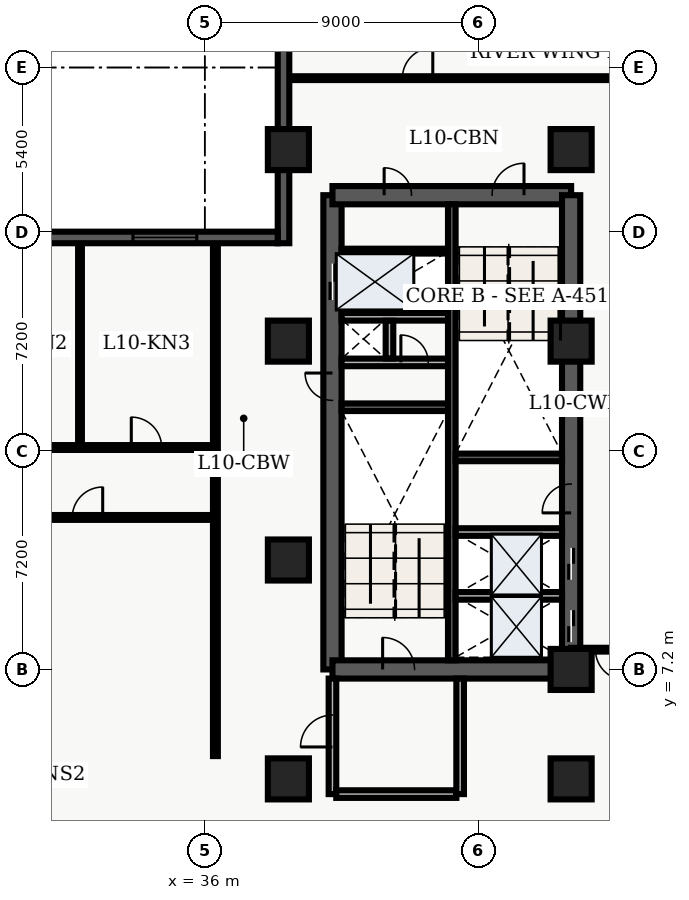
"""IFC4 building model, lengths in metres.
Left out: names, types, materials, properties, quantities, classifications, styles, units other than length and angle.
Written with IfcOpenShell. Run it as: python <this file> out.ifc"""

import sys

from ifc_helpers import new_model, entity, si_unit, converted_unit, direction, frame, origin_with_axes, origin_2d_with_axis, place, context, subcontext, project, spatial, polyline, rectangle, outline, extrude, element, fill, save


model = new_model("IFC4")
c1 = context("Model", 3, precision=1e-05, world=origin_with_axes(), true_north=direction((0.0, 1.0)))
c2 = subcontext(c1, "Body", "Model", "MODEL_VIEW")
j1 = project(units=[si_unit("LENGTHUNIT", "METRE"), converted_unit("PLANEANGLEUNIT", "DEGREE", entity("IfcPlaneAngleMeasure", 0.017), si_unit("PLANEANGLEUNIT", "RADIAN"), dimensions=[0, 0, 0, 0, 0, 0, 0])], contexts=[c1])
p1 = place(None, origin_with_axes())
s1 = spatial("IfcSite", under=j1, at=p1, CompositionType="ELEMENT")
p2 = place(p1, origin_with_axes())
s2 = spatial("IfcBuilding", under=s1, at=p2, CompositionType="ELEMENT")
p3 = place(p2, frame((0.0, 0.0, 44.4), z_axis=(0.0, 0.0, 1.0), x_axis=(1.0, 0.0, 0.0)))
s3 = spatial("IfcBuildingStorey", under=s2, at=p3, CompositionType="ELEMENT", Elevation=44.4)
p4 = place(p3, frame((40.2, 7.2, 0.0), z_axis=(0.0, 0.0, 1.0), x_axis=(0.0, 1.0, 0.0)))
e1 = element("IfcWall", 1, at=p4, inside=s3, PredefinedType="SHEAR", context=c2, shape_type="SweptSolid", body=[
    extrude(outline(polyline([(0.0, -0.3), (15.6, -0.3), (15.6, 0.3), (0.0, 0.3), (0.0, -0.3)])), origin_with_axes(), (0.0, 0.0, 1.0), 3.66),
])
p5 = place(p4, frame((12.75, 0.0, 0.0), z_axis=(0.0, 0.0, 1.0), x_axis=(1.0, 0.0, 0.0)))
e2 = element("IfcOpeningElement", 2, at=p5, cuts=e1, PredefinedType="OPENING", context=c2, shape_type="SweptSolid", body=[
    extrude(rectangle(XDim=1.2, YDim=0.62, at=origin_2d_with_axis()), origin_with_axes(), (0.0, 0.0, 1.0), 2.15),
])
p6 = place(p4, frame((9.3, 0.0, 0.0), z_axis=(0.0, 0.0, 1.0), x_axis=(1.0, 0.0, 0.0)))
e3 = element("IfcOpeningElement", 3, at=p6, cuts=e1, PredefinedType="OPENING", context=c2, shape_type="SweptSolid", body=[
    extrude(rectangle(XDim=0.9, YDim=0.62, at=origin_2d_with_axis()), origin_with_axes(), (0.0, 0.0, 1.0), 2.15),
])
p7 = place(p3, frame((40.2, 7.2, 0.0), z_axis=(0.0, 0.0, 1.0), x_axis=(1.0, 0.0, 0.0)))
e4 = element("IfcWall", 4, at=p7, inside=s3, PredefinedType="SHEAR", context=c2, shape_type="SweptSolid", body=[
    extrude(outline(polyline([(0.0, -0.3), (7.85, -0.3), (7.85, 0.3), (0.0, 0.3), (0.0, -0.3)])), origin_with_axes(), (0.0, 0.0, 1.0), 3.66),
])
p8 = place(p7, frame((2.175, 0.0, 0.0), z_axis=(0.0, 0.0, 1.0), x_axis=(1.0, 0.0, 0.0)))
e5 = element("IfcOpeningElement", 5, at=p8, cuts=e4, PredefinedType="OPENING", context=c2, shape_type="SweptSolid", body=[
    extrude(rectangle(XDim=1.05, YDim=0.62, at=origin_2d_with_axis()), origin_with_axes(), (0.0, 0.0, 1.0), 2.15),
])
p9 = place(p3, frame((40.2, 22.8, 0.0), z_axis=(0.0, 0.0, 1.0), x_axis=(1.0, 0.0, 0.0)))
e6 = element("IfcWall", 6, at=p9, inside=s3, PredefinedType="SHEAR", context=c2, shape_type="SweptSolid", body=[
    extrude(outline(polyline([(0.0, -0.3), (7.85, -0.3), (7.85, 0.3), (0.0, 0.3), (0.0, -0.3)])), origin_with_axes(), (0.0, 0.0, 1.0), 3.66),
])
p10 = place(p9, frame((5.775, 0.0, 0.0), z_axis=(0.0, 0.0, 1.0), x_axis=(1.0, 0.0, 0.0)))
e7 = element("IfcOpeningElement", 7, at=p10, cuts=e6, PredefinedType="OPENING", context=c2, shape_type="SweptSolid", body=[
    extrude(rectangle(XDim=1.05, YDim=0.62, at=origin_2d_with_axis()), origin_with_axes(), (0.0, 0.0, 1.0), 2.15),
])
p11 = place(p9, frame((2.15, 0.0, 0.0), z_axis=(0.0, 0.0, 1.0), x_axis=(1.0, 0.0, 0.0)))
e8 = element("IfcOpeningElement", 8, at=p11, cuts=e6, PredefinedType="OPENING", context=c2, shape_type="SweptSolid", body=[
    extrude(rectangle(XDim=0.9, YDim=0.62, at=origin_2d_with_axis()), origin_with_axes(), (0.0, 0.0, 1.0), 2.15),
])
p12 = place(p3, frame((48.05, 7.2, 0.0), z_axis=(0.0, 0.0, 1.0), x_axis=(0.0, 1.0, 0.0)))
e9 = element("IfcWall", 9, at=p12, inside=s3, PredefinedType="SHEAR", context=c2, shape_type="SweptSolid", body=[
    extrude(outline(polyline([(0.0, -0.3), (15.6, -0.3), (15.6, 0.3), (0.0, 0.3), (0.0, -0.3)])), origin_with_axes(), (0.0, 0.0, 1.0), 3.66),
])
p13 = place(p12, frame((1.425, 0.0, 0.0), z_axis=(0.0, 0.0, 1.0), x_axis=(1.0, 0.0, 0.0)))
e10 = element("IfcOpeningElement", 10, at=p13, cuts=e9, PredefinedType="OPENING", context=c2, shape_type="SweptSolid", body=[
    extrude(rectangle(XDim=1.05, YDim=0.62, at=origin_2d_with_axis()), origin_with_axes(), (0.0, 0.0, 1.0), 2.15),
])
p14 = place(p12, frame((3.475, 0.0, 0.0), z_axis=(0.0, 0.0, 1.0), x_axis=(1.0, 0.0, 0.0)))
e11 = element("IfcOpeningElement", 11, at=p14, cuts=e9, PredefinedType="OPENING", context=c2, shape_type="SweptSolid", body=[
    extrude(rectangle(XDim=1.05, YDim=0.62, at=origin_2d_with_axis()), origin_with_axes(), (0.0, 0.0, 1.0), 2.15),
])
p15 = place(p12, frame((5.625, 0.0, 0.0), z_axis=(0.0, 0.0, 1.0), x_axis=(1.0, 0.0, 0.0)))
e12 = element("IfcOpeningElement", 12, at=p15, cuts=e9, PredefinedType="OPENING", context=c2, shape_type="SweptSolid", body=[
    extrude(rectangle(XDim=0.95, YDim=0.62, at=origin_2d_with_axis()), origin_with_axes(), (0.0, 0.0, 1.0), 2.15),
])
p16 = place(p3, frame((44.125, 7.5, 0.0), z_axis=(0.0, 0.0, 1.0), x_axis=(0.0, 1.0, 0.0)))
e13 = element("IfcWall", 13, at=p16, inside=s3, PredefinedType="SHEAR", context=c2, shape_type="SweptSolid", body=[
    extrude(outline(polyline([(0.0, -0.125), (15.0, -0.125), (15.0, 0.125), (0.0, 0.125), (0.0, -0.125)])), origin_with_axes(), (0.0, 0.0, 1.0), 3.66),
])
for number, where, z_axis, x_axis in (
    (14, (40.5, 15.825, 0.0), (0.0, 0.0, 1.0), (1.0, 0.0, 0.0)),
    (15, (44.25, 14.175, 0.0), (0.0, 0.0, 1.0), (1.0, 0.0, 0.0)),
):
    element("IfcWall", number, at=place(p3, frame(where, z_axis=z_axis, x_axis=x_axis)), inside=s3, PredefinedType="SHEAR", context=c2, shape_type="SweptSolid", body=[
        extrude(outline(polyline([(0.0, -0.125), (3.5, -0.125), (3.5, 0.125), (0.0, 0.125), (0.0, -0.125)])), origin_with_axes(), (0.0, 0.0, 1.0), 3.66),
    ])
p17 = place(p3, frame((40.5, 17.3, 0.0), z_axis=(0.0, 0.0, 1.0), x_axis=(1.0, 0.0, 0.0)))
e16 = element("IfcWall", 16, at=p17, inside=s3, PredefinedType="SOLIDWALL", context=c2, shape_type="SweptSolid", body=[
    extrude(outline(polyline([(0.0, -0.125), (3.5, -0.125), (3.5, 0.125), (0.0, 0.125), (0.0, -0.125)])), origin_with_axes(), (0.0, 0.0, 1.0), 2.7),
])
p18 = place(p17, frame((2.4, 0.0, 0.0), z_axis=(0.0, 0.0, 1.0), x_axis=(1.0, 0.0, 0.0)))
e17 = element("IfcOpeningElement", 17, at=p18, cuts=e16, PredefinedType="OPENING", context=c2, shape_type="SweptSolid", body=[
    extrude(rectangle(XDim=0.9, YDim=0.27, at=origin_2d_with_axis()), origin_with_axes(), (0.0, 0.0, 1.0), 2.15),
])
p19 = place(p3, frame((40.5, 18.8, 0.0), z_axis=(0.0, 0.0, 1.0), x_axis=(1.0, 0.0, 0.0)))
e18 = element("IfcWall", 18, at=p19, inside=s3, PredefinedType="SOLIDWALL", context=c2, shape_type="SweptSolid", body=[
    extrude(outline(polyline([(0.0, -0.125), (3.5, -0.125), (3.5, 0.125), (0.0, 0.125), (0.0, -0.125)])), origin_with_axes(), (0.0, 0.0, 1.0), 2.7),
])
p20 = place(p3, frame((42.075, 17.43, 0.0), z_axis=(0.0, 0.0, 1.0), x_axis=(0.0, 1.0, 0.0)))
e19 = element("IfcWall", 19, at=p20, inside=s3, PredefinedType="SOLIDWALL", context=c2, shape_type="SweptSolid", body=[
    extrude(outline(polyline([(0.0, -0.125), (1.24, -0.125), (1.24, 0.125), (0.0, 0.125), (0.0, -0.125)])), origin_with_axes(), (0.0, 0.0, 1.0), 2.7),
])
p21 = place(p3, frame((40.2, 3.1, 0.0), z_axis=(0.0, 0.0, 1.0), x_axis=(0.0, 1.0, 0.0)))
e20 = element("IfcWall", 20, at=p21, inside=s3, PredefinedType="SOLIDWALL", context=c2, shape_type="SweptSolid", body=[
    extrude(outline(polyline([(0.0, -0.125), (3.8, -0.125), (3.8, 0.125), (0.0, 0.125), (0.0, -0.125)])), origin_with_axes(), (0.0, 0.0, 1.0), 2.7),
])
p22 = place(p21, frame((2.075, 0.0, 0.0), z_axis=(0.0, 0.0, 1.0), x_axis=(1.0, 0.0, 0.0)))
e21 = element("IfcOpeningElement", 21, at=p22, cuts=e20, PredefinedType="OPENING", context=c2, shape_type="SweptSolid", body=[
    extrude(rectangle(XDim=1.05, YDim=0.27, at=origin_2d_with_axis()), origin_with_axes(), (0.0, 0.0, 1.0), 2.15),
])
p23 = place(p3, frame((40.325, 3.1, 0.0), z_axis=(0.0, 0.0, 1.0), x_axis=(1.0, 0.0, 0.0)))
e22 = element("IfcWall", 22, at=p23, inside=s3, PredefinedType="SOLIDWALL", context=c2, shape_type="SweptSolid", body=[
    extrude(outline(polyline([(0.0, -0.125), (3.95, -0.125), (3.95, 0.125), (0.0, 0.125), (0.0, -0.125)])), origin_with_axes(), (0.0, 0.0, 1.0), 2.7),
])
p24 = place(p3, frame((44.4, 3.1, 0.0), z_axis=(0.0, 0.0, 1.0), x_axis=(0.0, 1.0, 0.0)))
e23 = element("IfcWall", 23, at=p24, inside=s3, PredefinedType="SOLIDWALL", context=c2, shape_type="SweptSolid", body=[
    extrude(outline(polyline([(0.0, -0.125), (3.8, -0.125), (3.8, 0.125), (0.0, 0.125), (0.0, -0.125)])), origin_with_axes(), (0.0, 0.0, 1.0), 2.7),
])
for number, where, z_axis, x_axis in (
    (24, (38.75, 3.6, 0.0), (0.0, 0.0, 1.0), (1.0, 0.0, 0.0)),
    (25, (38.75, 10.8, 0.0), (0.0, 0.0, 1.0), (1.0, 0.0, 0.0)),
    (26, (38.75, 18.0, 0.0), (0.0, 0.0, 1.0), (1.0, 0.0, 0.0)),
    (27, (38.75, 24.3, 0.0), (0.0, 0.0, 1.0), (1.0, 0.0, 0.0)),
    (28, (48.05, 3.6, 0.0), (0.0, 0.0, 1.0), (1.0, 0.0, 0.0)),
    (29, (48.05, 7.2, 0.0), (0.0, 0.0, 1.0), (1.0, 0.0, 0.0)),
    (30, (48.05, 18.0, 0.0), (0.0, 0.0, 1.0), (1.0, 0.0, 0.0)),
    (31, (48.05, 24.3, 0.0), (0.0, 0.0, 1.0), (1.0, 0.0, 0.0)),
):
    element("IfcColumn", number, at=place(p3, frame(where, z_axis=z_axis, x_axis=x_axis)), inside=s3, PredefinedType="COLUMN", context=c2, shape_type="SweptSolid", body=[
        extrude(rectangle(XDim=1.35, YDim=1.35, at=origin_2d_with_axis()), origin_with_axes(), (0.0, 0.0, 1.0), 3.9),
    ])
p25 = place(p3, frame((40.5, 20.96, 0.0), z_axis=(0.0, 0.0, 1.0), x_axis=(1.0, 0.0, 0.0)))
e32 = element("IfcWall", 32, at=p25, inside=s3, PredefinedType="PARTITIONING", context=c2, shape_type="SweptSolid", body=[
    extrude(outline(polyline([(0.0, -0.08), (3.5, -0.08), (3.5, 0.08), (0.0, 0.08), (0.0, -0.08)])), origin_with_axes(), (0.0, 0.0, 1.0), 2.7),
])
for number, where, z_axis, x_axis in (
    (33, (44.25, 9.62, 0.0), (0.0, 0.0, 1.0), (1.0, 0.0, 0.0)),
    (34, (44.25, 11.72, 0.0), (0.0, 0.0, 1.0), (1.0, 0.0, 0.0)),
):
    element("IfcWall", number, at=place(p3, frame(where, z_axis=z_axis, x_axis=x_axis)), inside=s3, PredefinedType="SOLIDWALL", context=c2, shape_type="SweptSolid", body=[
        extrude(outline(polyline([(0.0, -0.125), (3.5, -0.125), (3.5, 0.125), (0.0, 0.125), (0.0, -0.125)])), origin_with_axes(), (0.0, 0.0, 1.0), 2.7),
    ])
p26 = place(p3, frame((21.15, 12.2, 0.0), z_axis=(0.0, 0.0, 1.0), x_axis=(1.0, 0.0, 0.0)))
e35 = element("IfcWall", 35, at=p26, inside=s3, PredefinedType="PARTITIONING", context=c2, shape_type="SweptSolid", body=[
    extrude(outline(polyline([(0.0, -0.08), (15.2, -0.08), (15.2, 0.08), (0.0, 0.08), (0.0, -0.08)])), origin_with_axes(), (0.0, 0.0, 1.0), 2.7),
])
p27 = place(p26, frame((3.522, 0.0, 0.0), z_axis=(0.0, 0.0, 1.0), x_axis=(1.0, 0.0, 0.0)))
e36 = element("IfcOpeningElement", 36, at=p27, cuts=e35, PredefinedType="OPENING", context=c2, shape_type="SweptSolid", body=[
    extrude(rectangle(XDim=1.0, YDim=0.18, at=origin_2d_with_axis()), origin_with_axes(), (0.0, 0.0, 1.0), 2.15),
])
p28 = place(p26, frame((10.992, 0.0, 0.0), z_axis=(0.0, 0.0, 1.0), x_axis=(1.0, 0.0, 0.0)))
e37 = element("IfcOpeningElement", 37, at=p28, cuts=e35, PredefinedType="OPENING", context=c2, shape_type="SweptSolid", body=[
    extrude(rectangle(XDim=1.0, YDim=0.18, at=origin_2d_with_axis()), origin_with_axes(), (0.0, 0.0, 1.0), 2.15),
])
p29 = place(p3, frame((21.15, 14.5, 0.0), z_axis=(0.0, 0.0, 1.0), x_axis=(1.0, 0.0, 0.0)))
e38 = element("IfcWall", 38, at=p29, inside=s3, PredefinedType="PARTITIONING", context=c2, shape_type="SweptSolid", body=[
    extrude(outline(polyline([(0.0, -0.08), (15.2, -0.08), (15.2, 0.08), (0.0, 0.08), (0.0, -0.08)])), origin_with_axes(), (0.0, 0.0, 1.0), 2.7),
])
p30 = place(p29, frame((3.607, 0.0, 0.0), z_axis=(0.0, 0.0, 1.0), x_axis=(1.0, 0.0, 0.0)))
e39 = element("IfcOpeningElement", 39, at=p30, cuts=e38, PredefinedType="OPENING", context=c2, shape_type="SweptSolid", body=[
    extrude(rectangle(XDim=1.0, YDim=0.18, at=origin_2d_with_axis()), origin_with_axes(), (0.0, 0.0, 1.0), 2.15),
])
p31 = place(p29, frame((8.89, 0.0, 0.0), z_axis=(0.0, 0.0, 1.0), x_axis=(1.0, 0.0, 0.0)))
e40 = element("IfcOpeningElement", 40, at=p31, cuts=e38, PredefinedType="OPENING", context=c2, shape_type="SweptSolid", body=[
    extrude(rectangle(XDim=1.0, YDim=0.18, at=origin_2d_with_axis()), origin_with_axes(), (0.0, 0.0, 1.0), 2.15),
])
p32 = place(p29, frame((12.933, 0.0, 0.0), z_axis=(0.0, 0.0, 1.0), x_axis=(1.0, 0.0, 0.0)))
e41 = element("IfcOpeningElement", 41, at=p32, cuts=e38, PredefinedType="OPENING", context=c2, shape_type="SweptSolid", body=[
    extrude(rectangle(XDim=1.0, YDim=0.18, at=origin_2d_with_axis()), origin_with_axes(), (0.0, 0.0, 1.0), 2.15),
])
p33 = place(p3, frame((36.35, 4.35, 0.0), z_axis=(0.0, 0.0, 1.0), x_axis=(0.0, 1.0, 0.0)))
e42 = element("IfcWall", 42, at=p33, inside=s3, PredefinedType="PARTITIONING", context=c2, shape_type="SweptSolid", body=[
    extrude(outline(polyline([(0.0, -0.08), (16.95, -0.08), (16.95, 0.08), (0.0, 0.08), (0.0, -0.08)])), origin_with_axes(), (0.0, 0.0, 1.0), 2.7),
])
p34 = place(p3, frame((31.896, 14.62, 0.0), z_axis=(0.0, 0.0, 1.0), x_axis=(0.0, 1.0, 0.0)))
e43 = element("IfcWall", 43, at=p34, inside=s3, PredefinedType="PARTITIONING", context=c2, shape_type="SweptSolid", body=[
    extrude(outline(polyline([(0.0, -0.062), (6.605, -0.062), (6.605, 0.062), (0.0, 0.062), (0.0, -0.062)])), origin_with_axes(), (0.0, 0.0, 1.0), 2.7),
])
p35 = place(p3, frame((59.64, 7.85, 0.0), z_axis=(0.0, 0.0, 1.0), x_axis=(-1.0, 0.0, 0.0)))
e44 = element("IfcWall", 44, at=p35, inside=s3, PredefinedType="PARTITIONING", context=c2, shape_type="SweptSolid", body=[
    extrude(outline(polyline([(0.0, -0.062), (11.59, -0.062), (11.59, 0.062), (0.0, 0.062), (0.0, -0.062)])), origin_with_axes(), (0.0, 0.0, 1.0), 2.7),
])
p36 = place(p35, frame((10.29, 0.0, 0.0), z_axis=(0.0, 0.0, 1.0), x_axis=(1.0, 0.0, 0.0)))
e45 = element("IfcOpeningElement", 45, at=p36, cuts=e44, PredefinedType="OPENING", context=c2, shape_type="SweptSolid", body=[
    extrude(rectangle(XDim=1.0, YDim=0.145, at=origin_2d_with_axis()), origin_with_axes(), (0.0, 0.0, 1.0), 2.15),
])
p37 = place(p3, frame((38.76, 26.65, 0.0), z_axis=(0.0, 0.0, 1.0), x_axis=(1.0, 0.0, 0.0)))
e46 = element("IfcWall", 46, at=p37, inside=s3, PredefinedType="PARTITIONING", context=c2, shape_type="SweptSolid", body=[
    extrude(outline(polyline([(0.0, -0.062), (20.88, -0.062), (20.88, 0.062), (0.0, 0.062), (0.0, -0.062)])), origin_with_axes(), (0.0, 0.0, 1.0), 2.7),
])
p38 = place(p37, frame((4.24, 0.0, 0.0), z_axis=(0.0, 0.0, 1.0), x_axis=(1.0, 0.0, 0.0)))
e47 = element("IfcOpeningElement", 47, at=p38, cuts=e46, PredefinedType="OPENING", context=c2, shape_type="SweptSolid", body=[
    extrude(rectangle(XDim=1.0, YDim=0.145, at=origin_2d_with_axis()), origin_with_axes(), (0.0, 0.0, 1.0), 2.15),
])
p39 = place(p3, frame((38.59, 21.22, 0.0), z_axis=(0.0, 0.0, 1.0), x_axis=(0.0, 1.0, 0.0)))
e48 = element("IfcWall", 48, at=p39, inside=s3, PredefinedType="SOLIDWALL", context=c2, shape_type="SweptSolid", body=[
    extrude(outline(polyline([(0.0, -0.19), (7.58, -0.19), (7.58, 0.19), (0.0, 0.19), (0.0, -0.19)])), origin_with_axes(), (0.0, 0.0, 1.0), 3.66),
])
p40 = place(p3, frame((21.22, 21.41, 0.0), z_axis=(0.0, 0.0, 1.0), x_axis=(1.0, 0.0, 0.0)))
e49 = element("IfcWall", 49, at=p40, inside=s3, PredefinedType="SOLIDWALL", context=c2, shape_type="SweptSolid", body=[
    extrude(outline(polyline([(0.0, -0.19), (17.18, -0.19), (17.18, 0.19), (0.0, 0.19), (0.0, -0.19)])), origin_with_axes(), (0.0, 0.0, 1.0), 3.66),
])
p41 = place(p40, frame((3.263, 0.0, 0.45), z_axis=(0.0, 0.0, 1.0), x_axis=(1.0, 0.0, 0.0)))
e50 = element("IfcOpeningElement", 50, at=p41, cuts=e49, PredefinedType="OPENING", context=c2, shape_type="SweptSolid", body=[
    extrude(rectangle(XDim=2.1, YDim=0.4, at=origin_2d_with_axis()), origin_with_axes(), (0.0, 0.0, 1.0), 2.2),
])
p42 = place(p40, frame((8.59, 0.0, 0.45), z_axis=(0.0, 0.0, 1.0), x_axis=(1.0, 0.0, 0.0)))
e51 = element("IfcOpeningElement", 51, at=p42, cuts=e49, PredefinedType="OPENING", context=c2, shape_type="SweptSolid", body=[
    extrude(rectangle(XDim=2.1, YDim=0.4, at=origin_2d_with_axis()), origin_with_axes(), (0.0, 0.0, 1.0), 2.2),
])
p43 = place(p40, frame((13.467, 0.0, 0.45), z_axis=(0.0, 0.0, 1.0), x_axis=(1.0, 0.0, 0.0)))
e52 = element("IfcOpeningElement", 52, at=p43, cuts=e49, PredefinedType="OPENING", context=c2, shape_type="SweptSolid", body=[
    extrude(rectangle(XDim=2.1, YDim=0.4, at=origin_2d_with_axis()), origin_with_axes(), (0.0, 0.0, 1.0), 2.2),
])
p44 = place(p12, frame((1.425, 0.0, 0.0), z_axis=(0.0, 0.0, 1.0), x_axis=(1.0, 0.0, 0.0)))
e53 = element("IfcDoor", 53, at=p44, inside=s3, OperationType="SLIDING_TO_LEFT", PredefinedType="DOOR", context=c2, shape_type="SweptSolid", body=[
    extrude(rectangle(XDim=1.05, YDim=0.09, at=origin_2d_with_axis()), origin_with_axes(), (0.0, 0.0, 1.0), 2.15),
])
fill(e10, e53)
p45 = place(p12, frame((3.475, 0.0, 0.0), z_axis=(0.0, 0.0, 1.0), x_axis=(1.0, 0.0, 0.0)))
e54 = element("IfcDoor", 54, at=p45, inside=s3, OperationType="SLIDING_TO_RIGHT", PredefinedType="DOOR", context=c2, shape_type="SweptSolid", body=[
    extrude(rectangle(XDim=1.05, YDim=0.09, at=origin_2d_with_axis()), origin_with_axes(), (0.0, 0.0, 1.0), 2.15),
])
fill(e11, e54)
p46 = place(p4, frame((12.75, 0.0, 0.0), z_axis=(0.0, 0.0, 1.0), x_axis=(1.0, 0.0, 0.0)))
e55 = element("IfcDoor", 55, at=p46, inside=s3, OperationType="DOUBLE_DOOR_SLIDING", PredefinedType="DOOR", context=c2, shape_type="SweptSolid", body=[
    extrude(rectangle(XDim=1.2, YDim=0.09, at=origin_2d_with_axis()), origin_with_axes(), (0.0, 0.0, 1.0), 2.15),
])
fill(e2, e55)
p47 = place(p4, frame((9.3, 0.0, 0.0), z_axis=(0.0, 0.0, 1.0), x_axis=(1.0, 0.0, 0.0)))
e56 = element("IfcDoor", 56, at=p47, inside=s3, OperationType="SINGLE_SWING_RIGHT", PredefinedType="DOOR", context=c2, shape_type="SweptSolid", body=[
    extrude(rectangle(XDim=0.9, YDim=0.09, at=origin_2d_with_axis()), origin_with_axes(), (0.0, 0.0, 1.0), 2.15),
])
fill(e3, e56)
p48 = place(p17, frame((2.4, 0.0, 0.0), z_axis=(0.0, 0.0, 1.0), x_axis=(1.0, 0.0, 0.0)))
e57 = element("IfcDoor", 57, at=p48, inside=s3, OperationType="SINGLE_SWING_LEFT", PredefinedType="DOOR", context=c2, shape_type="SweptSolid", body=[
    extrude(rectangle(XDim=0.9, YDim=0.09, at=origin_2d_with_axis()), origin_with_axes(), (0.0, 0.0, 1.0), 2.15),
])
fill(e17, e57)
p49 = place(p7, frame((2.175, 0.0, 0.0), z_axis=(0.0, 0.0, 1.0), x_axis=(1.0, 0.0, 0.0)))
e58 = element("IfcDoor", 58, at=p49, inside=s3, OperationType="SINGLE_SWING_LEFT", PredefinedType="DOOR", context=c2, shape_type="SweptSolid", body=[
    extrude(rectangle(XDim=1.05, YDim=0.09, at=origin_2d_with_axis()), origin_with_axes(), (0.0, 0.0, 1.0), 2.15),
])
fill(e5, e58)
p50 = place(p9, frame((5.775, 0.0, 0.0), z_axis=(0.0, 0.0, 1.0), x_axis=(1.0, 0.0, 0.0)))
e59 = element("IfcDoor", 59, at=p50, inside=s3, OperationType="SINGLE_SWING_RIGHT", PredefinedType="DOOR", context=c2, shape_type="SweptSolid", body=[
    extrude(rectangle(XDim=1.05, YDim=0.09, at=origin_2d_with_axis()), origin_with_axes(), (0.0, 0.0, 1.0), 2.15),
])
fill(e7, e59)
p51 = place(p21, frame((2.075, 0.0, 0.0), z_axis=(0.0, 0.0, 1.0), x_axis=(1.0, 0.0, 0.0)))
e60 = element("IfcDoor", 60, at=p51, inside=s3, OperationType="SINGLE_SWING_LEFT", PredefinedType="DOOR", context=c2, shape_type="SweptSolid", body=[
    extrude(rectangle(XDim=1.05, YDim=0.09, at=origin_2d_with_axis()), origin_with_axes(), (0.0, 0.0, 1.0), 2.15),
])
fill(e21, e60)
p52 = place(p9, frame((2.15, 0.0, 0.0), z_axis=(0.0, 0.0, 1.0), x_axis=(1.0, 0.0, 0.0)))
e61 = element("IfcDoor", 61, at=p52, inside=s3, OperationType="SINGLE_SWING_LEFT", PredefinedType="DOOR", context=c2, shape_type="SweptSolid", body=[
    extrude(rectangle(XDim=0.9, YDim=0.09, at=origin_2d_with_axis()), origin_with_axes(), (0.0, 0.0, 1.0), 2.15),
])
fill(e8, e61)
p53 = place(p12, frame((5.625, 0.0, 0.0), z_axis=(0.0, 0.0, 1.0), x_axis=(1.0, 0.0, 0.0)))
e62 = element("IfcDoor", 62, at=p53, inside=s3, OperationType="SINGLE_SWING_LEFT", PredefinedType="DOOR", context=c2, shape_type="SweptSolid", body=[
    extrude(rectangle(XDim=0.95, YDim=0.09, at=origin_2d_with_axis()), origin_with_axes(), (0.0, 0.0, 1.0), 2.15),
])
fill(e12, e62)
p54 = place(p26, frame((10.992, 0.0, 0.0), z_axis=(0.0, 0.0, 1.0), x_axis=(1.0, 0.0, 0.0)))
e63 = element("IfcDoor", 63, at=p54, inside=s3, OperationType="SINGLE_SWING_RIGHT", PredefinedType="DOOR", context=c2, shape_type="SweptSolid", body=[
    extrude(rectangle(XDim=1.0, YDim=0.09, at=origin_2d_with_axis()), origin_with_axes(), (0.0, 0.0, 1.0), 2.15),
])
fill(e37, e63)
p55 = place(p29, frame((12.933, 0.0, 0.0), z_axis=(0.0, 0.0, 1.0), x_axis=(1.0, 0.0, 0.0)))
e64 = element("IfcDoor", 64, at=p55, inside=s3, OperationType="SINGLE_SWING_LEFT", PredefinedType="DOOR", context=c2, shape_type="SweptSolid", body=[
    extrude(rectangle(XDim=1.0, YDim=0.09, at=origin_2d_with_axis()), origin_with_axes(), (0.0, 0.0, 1.0), 2.15),
])
fill(e41, e64)
p56 = place(p35, frame((10.29, 0.0, 0.0), z_axis=(0.0, 0.0, 1.0), x_axis=(1.0, 0.0, 0.0)))
e65 = element("IfcDoor", 65, at=p56, inside=s3, OperationType="SINGLE_SWING_LEFT", PredefinedType="DOOR", context=c2, shape_type="SweptSolid", body=[
    extrude(rectangle(XDim=1.0, YDim=0.075, at=origin_2d_with_axis()), origin_with_axes(), (0.0, 0.0, 1.0), 2.15),
])
fill(e45, e65)
p57 = place(p37, frame((4.24, 0.0, 0.0), z_axis=(0.0, 0.0, 1.0), x_axis=(1.0, 0.0, 0.0)))
e66 = element("IfcDoor", 66, at=p57, inside=s3, OperationType="SINGLE_SWING_RIGHT", PredefinedType="DOOR", context=c2, shape_type="SweptSolid", body=[
    extrude(rectangle(XDim=1.0, YDim=0.075, at=origin_2d_with_axis()), origin_with_axes(), (0.0, 0.0, 1.0), 2.15),
])
fill(e47, e66)
p58 = place(p40, frame((13.467, 0.0, 0.45), z_axis=(0.0, 0.0, 1.0), x_axis=(1.0, 0.0, 0.0)))
e67 = element("IfcWindow", 67, at=p58, inside=s3, PredefinedType="WINDOW", context=c2, shape_type="SweptSolid", body=[
    extrude(rectangle(XDim=2.1, YDim=0.09, at=origin_2d_with_axis()), origin_with_axes(), (0.0, 0.0, 1.0), 2.2),
])
fill(e52, e67)
save(model, sys.argv[1])
